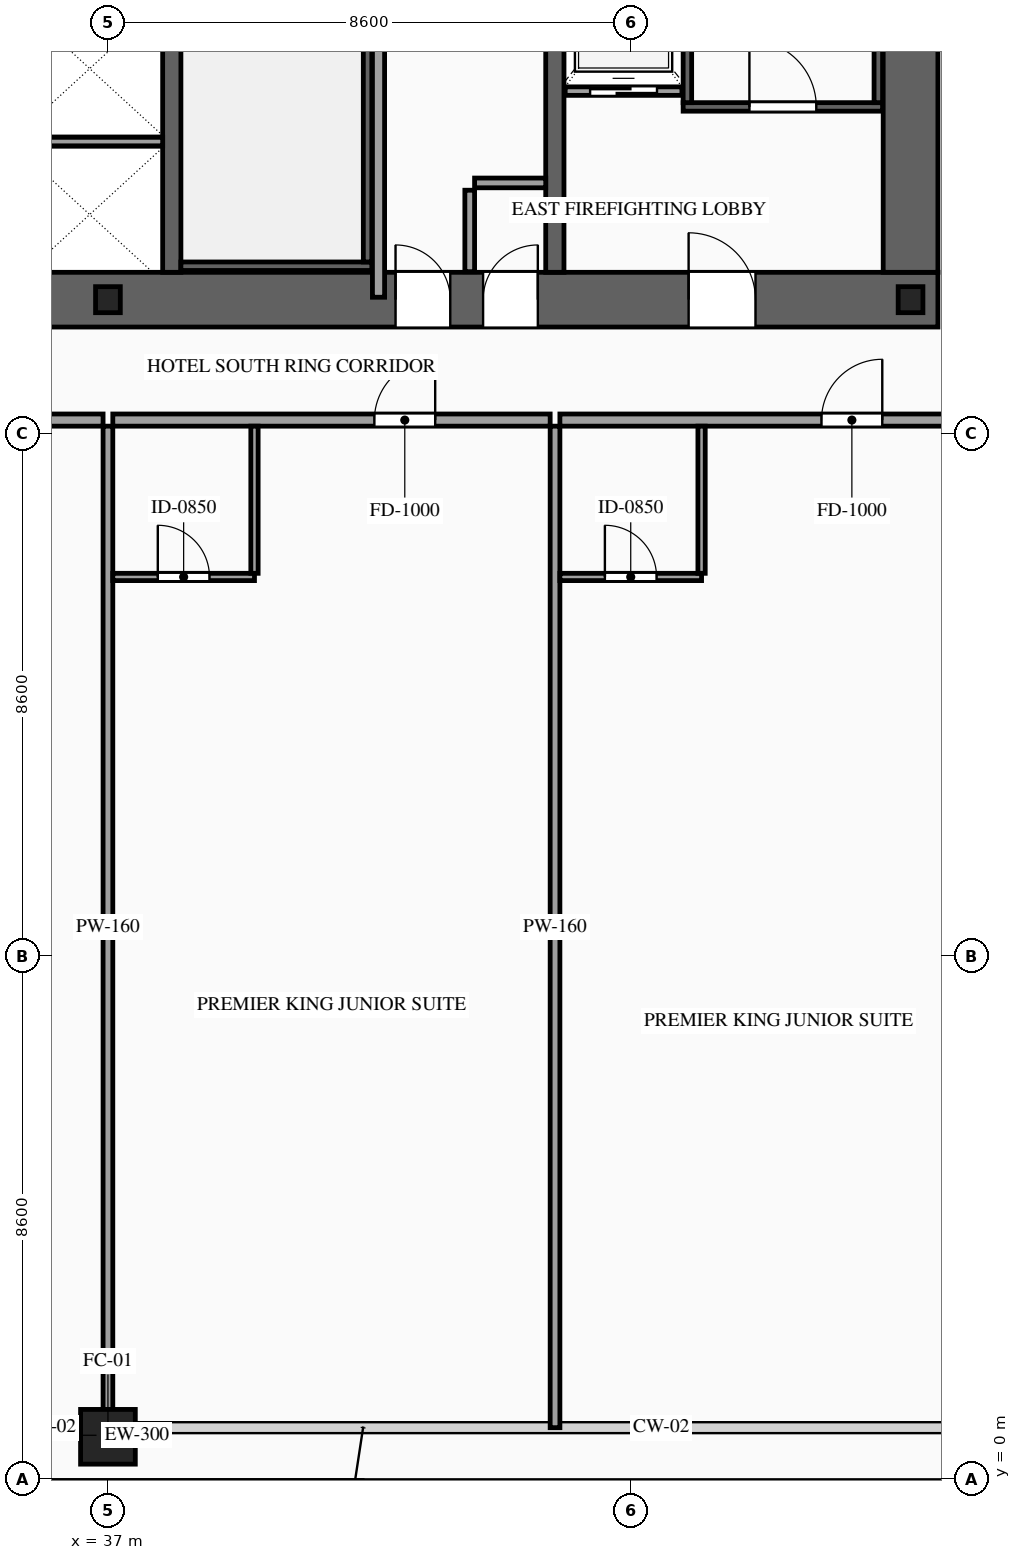
"""IFC4 building model, lengths in metres.
Left out: names, types, materials, properties, quantities, classifications, styles, units other than length and angle.
Written with IfcOpenShell. Run it as: python <this file> out.ifc"""

import sys

from ifc_helpers import new_model, si_unit, direction, frame, frame_2d, origin, origin_2d, place, context, subcontext, project, spatial, rectangle, hollow_rectangle, i_section, extrude, source, transform, mapped, element, fill, save


model = new_model("IFC4")
c1 = context("Model", 3, precision=1e-05, world=origin(), true_north=direction((0.0, 1.0)))
c2 = subcontext(c1, "Body", "Model", "MODEL_VIEW")
j1 = project(units=[si_unit("LENGTHUNIT", "METRE"), si_unit("PLANEANGLEUNIT", "RADIAN")], contexts=[c1])
p1 = place(None, origin())
s1 = spatial("IfcSite", under=j1, at=p1, CompositionType="ELEMENT")
p2 = place(p1, origin())
s2 = spatial("IfcBuilding", under=s1, at=p2, CompositionType="ELEMENT")
p3 = place(p2, frame((0.0, 0.0, 34.2)))
s3 = spatial("IfcBuildingStorey", under=s2, at=p3, CompositionType="ELEMENT", Elevation=34.2)
p4 = place(p3, frame((23.35, 19.4, 0.0), z_axis=(0.0, 0.0, 1.0), x_axis=(1.0, 0.0, 0.0)))
e1 = element("IfcWall", 1, at=p4, inside=s3, PredefinedType="SHEAR", context=c2, shape_type="SweptSolid", body=[
    extrude(rectangle(XDim=27.3, YDim=0.9, at=frame_2d((13.65, 0.0))), origin(), (0.0, 0.0, 1.0), 3.6),
])
p5 = place(p4, frame((2.1, 0.0, 0.0)))
e2 = element("IfcOpeningElement", 2, at=p5, cuts=e1, PredefinedType="OPENING", context=c2, shape_type="SweptSolid", body=[
    extrude(rectangle(XDim=1.1, YDim=2.2, at=frame_2d((0.55, 1.1))), frame((0.0, 0.465, 0.0), z_axis=(0.0, -1.0, 0.0), x_axis=(1.0, 0.0, 0.0)), (0.0, 0.0, 1.0), 0.93),
])
p6 = place(p4, frame((10.0, 0.0, 0.0)))
e3 = element("IfcOpeningElement", 3, at=p6, cuts=e1, PredefinedType="OPENING", context=c2, shape_type="SweptSolid", body=[
    extrude(rectangle(XDim=1.1, YDim=2.2, at=frame_2d((0.55, 1.1))), frame((0.0, 0.465, 0.0), z_axis=(0.0, -1.0, 0.0), x_axis=(1.0, 0.0, 0.0)), (0.0, 0.0, 1.0), 0.93),
])
p7 = place(p4, frame((23.2, 0.0, 0.0)))
e4 = element("IfcOpeningElement", 4, at=p7, cuts=e1, PredefinedType="OPENING", context=c2, shape_type="SweptSolid", body=[
    extrude(rectangle(XDim=1.1, YDim=2.2, at=frame_2d((0.55, 1.1))), frame((0.0, 0.465, 0.0), z_axis=(0.0, -1.0, 0.0), x_axis=(1.0, 0.0, 0.0)), (0.0, 0.0, 1.0), 0.93),
])
p8 = place(p4, frame((19.82, 0.0, 0.0)))
e5 = element("IfcOpeningElement", 5, at=p8, cuts=e1, PredefinedType="OPENING", context=c2, shape_type="SweptSolid", body=[
    extrude(rectangle(XDim=0.9, YDim=2.15, at=frame_2d((0.45, 1.075))), frame((0.0, 0.465, 0.0), z_axis=(0.0, -1.0, 0.0), x_axis=(1.0, 0.0, 0.0)), (0.0, 0.0, 1.0), 0.93),
])
p9 = place(p4, frame((18.38, 0.0, 0.0)))
e6 = element("IfcOpeningElement", 6, at=p9, cuts=e1, PredefinedType="OPENING", context=c2, shape_type="SweptSolid", body=[
    extrude(rectangle(XDim=0.9, YDim=2.15, at=frame_2d((0.45, 1.075))), frame((0.0, 0.465, 0.0), z_axis=(0.0, -1.0, 0.0), x_axis=(1.0, 0.0, 0.0)), (0.0, 0.0, 1.0), 0.93),
])
m1 = source(origin(), c2, "Body", "SweptSolid", [
    extrude(rectangle(XDim=11.9, YDim=0.9, at=frame_2d((5.95, 0.0))), origin(), (0.0, 0.0, 1.0), 3.6),
])
p10 = place(p3, frame((50.2, 19.85, 0.0), z_axis=(0.0, 0.0, 1.0), x_axis=(0.0, 1.0, 0.0)))
e7 = element("IfcWall", 7, at=p10, inside=s3, PredefinedType="SHEAR", context=c2, shape_type="MappedRepresentation", body=[
    mapped(m1, transform((0.0, 0.0, 0.0), scale=1.0)),
])
m2 = source(origin(), c2, "Body", "SweptSolid", [
    extrude(rectangle(XDim=11.9, YDim=0.3, at=frame_2d((5.95, 0.0))), origin(), (0.0, 0.0, 1.0), 3.6),
])
for number, where, z_axis, x_axis in (
    (8, (38.05, 19.85, 0.0), (0.0, 0.0, 1.0), (0.0, 1.0, 0.0)),
    (9, (44.35, 19.85, 0.0), (0.0, 0.0, 1.0), (0.0, 1.0, 0.0)),
):
    element("IfcWall", number, at=place(p3, frame(where, z_axis=z_axis, x_axis=x_axis)), inside=s3, PredefinedType="SOLIDWALL", context=c2, shape_type="MappedRepresentation", body=[
        mapped(m2, transform((0.0, 0.0, 0.0), scale=1.0)),
    ])
m3 = source(origin(), c2, "Body", "SweptSolid", [
    extrude(i_section(OverallWidth=0.407, OverallDepth=0.428, WebThickness=0.02, FlangeThickness=0.035, at=origin_2d()), origin(), (0.0, 0.0, 1.0), 3.6),
])
for number, where, z_axis, x_axis in (
    (10, (37.0, 19.4, 0.0), (0.0, 0.0, 1.0), (1.0, 0.0, 0.0)),
    (11, (50.2, 19.4, 0.0), (0.0, 0.0, 1.0), (1.0, 0.0, 0.0)),
):
    element("IfcColumn", number, at=place(p3, frame(where, z_axis=z_axis, x_axis=x_axis)), inside=s3, PredefinedType="COLUMN", context=c2, shape_type="MappedRepresentation", body=[
        mapped(m3, transform((0.0, 0.0, 0.0), scale=1.0)),
    ])
m4 = source(origin(), c2, "Body", "SweptSolid", [
    extrude(hollow_rectangle(XDim=0.9, YDim=0.9, WallThickness=0.042, at=origin_2d()), origin(), (0.0, 0.0, 1.0), 3.6),
])
p11 = place(p3, frame((37.0, 0.7, 0.0), z_axis=(0.0, 0.0, 1.0), x_axis=(1.0, 0.0, 0.0)))
e12 = element("IfcColumn", 12, at=p11, inside=s3, PredefinedType="COLUMN", context=c2, shape_type="MappedRepresentation", body=[
    mapped(m4, transform((0.0, 0.0, 0.0), scale=1.0)),
])
p12 = place(p3, frame((44.52, 22.83, 0.0), z_axis=(0.0, 0.0, 1.0), x_axis=(1.0, 0.0, 0.0)))
e13 = element("IfcWall", 13, at=p12, inside=s3, PredefinedType="SOLIDWALL", context=c2, shape_type="SweptSolid", body=[
    extrude(rectangle(XDim=1.92, YDim=0.14, at=frame_2d((0.96, 0.0))), origin(), (0.0, 0.0, 1.0), 3.38),
])
p13 = place(p12, frame((0.41, 0.0, 0.0)))
e14 = element("IfcOpeningElement", 14, at=p13, cuts=e13, PredefinedType="OPENING", context=c2, shape_type="SweptSolid", body=[
    extrude(rectangle(XDim=1.1, YDim=2.2, at=frame_2d((0.55, 1.1))), frame((0.0, 0.085, 0.0), z_axis=(0.0, -1.0, 0.0), x_axis=(1.0, 0.0, 0.0)), (0.0, 0.0, 1.0), 0.17),
])
m5 = source(origin(), c2, "Body", "SweptSolid", [
    extrude(rectangle(XDim=2.4, YDim=0.14, at=frame_2d((1.2, 0.0))), origin(), (0.0, 0.0, 1.0), 3.38),
])
p14 = place(p3, frame((35.5, 22.0, 0.0), z_axis=(0.0, 0.0, 1.0), x_axis=(1.0, 0.0, 0.0)))
e15 = element("IfcWall", 15, at=p14, inside=s3, PredefinedType="SOLIDWALL", context=c2, shape_type="MappedRepresentation", body=[
    mapped(m5, transform((0.0, 0.0, 0.0), scale=1.0)),
])
p15 = place(p3, frame((46.46, 22.57, 0.0), z_axis=(0.0, 0.0, 1.0), x_axis=(1.0, 0.0, 0.0)))
e16 = element("IfcWall", 16, at=p15, inside=s3, PredefinedType="SOLIDWALL", context=c2, shape_type="SweptSolid", body=[
    extrude(rectangle(XDim=3.28, YDim=0.14, at=frame_2d((1.64, 0.0))), origin(), (0.0, 0.0, 1.0), 3.38),
])
p16 = place(p15, frame((1.09, 0.0, 0.0)))
e17 = element("IfcOpeningElement", 17, at=p16, cuts=e16, PredefinedType="OPENING", context=c2, shape_type="SweptSolid", body=[
    extrude(rectangle(XDim=1.1, YDim=2.2, at=frame_2d((0.55, 1.1))), frame((0.0, 0.085, 0.0), z_axis=(0.0, -1.0, 0.0), x_axis=(1.0, 0.0, 0.0)), (0.0, 0.0, 1.0), 0.17),
])
m6 = source(origin(), c2, "Body", "SweptSolid", [
    extrude(rectangle(XDim=8.94, YDim=0.14, at=frame_2d((4.47, 0.0))), origin(), (0.0, 0.0, 1.0), 3.38),
])
for number, where, z_axis, x_axis in (
    (18, (46.53, 22.64, 0.0), (0.0, 0.0, 1.0), (0.0, 1.0, 0.0)),
    (19, (49.67, 22.64, 0.0), (0.0, 0.0, 1.0), (0.0, 1.0, 0.0)),
):
    element("IfcWall", number, at=place(p3, frame(where, z_axis=z_axis, x_axis=x_axis)), inside=s3, PredefinedType="SOLIDWALL", context=c2, shape_type="MappedRepresentation", body=[
        mapped(m6, transform((0.0, 0.0, 0.0), scale=1.0)),
    ])
m7 = source(origin(), c2, "Body", "SweptSolid", [
    extrude(rectangle(XDim=3.14, YDim=0.14, at=frame_2d((1.57, 0.0))), origin(), (0.0, 0.0, 1.0), 3.38),
])
p17 = place(p3, frame((38.2, 19.95, 0.0), z_axis=(0.0, 0.0, 1.0), x_axis=(1.0, 0.0, 0.0)))
e20 = element("IfcWall", 20, at=p17, inside=s3, PredefinedType="SOLIDWALL", context=c2, shape_type="MappedRepresentation", body=[
    mapped(m7, transform((0.0, 0.0, 0.0), scale=1.0)),
])
m8 = source(origin(), c2, "Body", "SweptSolid", [
    extrude(rectangle(XDim=8.94, YDim=0.14, at=frame_2d((4.47, 0.0))), origin(), (0.0, 0.0, 1.0), 3.38),
])
p18 = place(p3, frame((41.27, 20.02, 0.0), z_axis=(0.0, 0.0, 1.0), x_axis=(0.0, 1.0, 0.0)))
e21 = element("IfcWall", 21, at=p18, inside=s3, PredefinedType="SOLIDWALL", context=c2, shape_type="MappedRepresentation", body=[
    mapped(m8, transform((0.0, 0.0, 0.0), scale=1.0)),
])
m9 = source(origin(), c2, "Body", "SweptSolid", [
    extrude(rectangle(XDim=1.34, YDim=0.16, at=frame_2d((0.67, 0.0))), origin(), (0.0, 0.0, 1.0), 3.38),
])
p19 = place(p3, frame((42.95, 19.86, 0.0), z_axis=(0.0, 0.0, 1.0), x_axis=(0.0, 1.0, 0.0)))
e22 = element("IfcWall", 22, at=p19, inside=s3, PredefinedType="PARTITIONING", context=c2, shape_type="MappedRepresentation", body=[
    mapped(m9, transform((0.0, 0.0, 0.0), scale=1.0)),
])
m10 = source(origin(), c2, "Body", "SweptSolid", [
    extrude(rectangle(XDim=1.17, YDim=0.16, at=frame_2d((0.585, 0.0))), origin(), (0.0, 0.0, 1.0), 3.38),
])
p20 = place(p3, frame((43.03, 21.32, 0.0), z_axis=(0.0, 0.0, 1.0), x_axis=(1.0, 0.0, 0.0)))
e23 = element("IfcWall", 23, at=p20, inside=s3, PredefinedType="PARTITIONING", context=c2, shape_type="MappedRepresentation", body=[
    mapped(m10, transform((0.0, 0.0, 0.0), scale=1.0)),
])
m11 = source(origin(), c2, "Body", "SweptSolid", [
    extrude(rectangle(XDim=12.72, YDim=0.2, at=frame_2d((6.36, 0.0))), origin(), (0.0, 0.0, 1.0), 3.38),
])
p21 = place(p3, frame((41.45, 19.44, 0.0), z_axis=(0.0, 0.0, 1.0), x_axis=(0.0, 1.0, 0.0)))
e24 = element("IfcWall", 24, at=p21, inside=s3, PredefinedType="PARTITIONING", context=c2, shape_type="MappedRepresentation", body=[
    mapped(m11, transform((0.0, 0.0, 0.0), scale=1.0)),
])
p22 = place(p3, frame((29.727, 17.42, 0.0), z_axis=(0.0, 0.0, 1.0), x_axis=(1.0, 0.0, 0.0)))
e25 = element("IfcWall", 25, at=p22, inside=s3, PredefinedType="PARTITIONING", context=c2, shape_type="SweptSolid", body=[
    extrude(rectangle(XDim=7.193, YDim=0.2, at=frame_2d((3.596, 0.0))), origin(), (0.0, 0.0, 1.0), 3.38),
])
p23 = place(p22, frame((4.302, 0.0, 0.0)))
e26 = element("IfcOpeningElement", 26, at=p23, cuts=e25, PredefinedType="OPENING", context=c2, shape_type="SweptSolid", body=[
    extrude(rectangle(XDim=1.0, YDim=2.2, at=frame_2d((0.5, 1.1))), frame((0.0, 0.115, 0.0), z_axis=(0.0, -1.0, 0.0), x_axis=(1.0, 0.0, 0.0)), (0.0, 0.0, 1.0), 0.23),
])
m12 = source(origin(), c2, "Body", "SweptSolid", [
    extrude(rectangle(XDim=16.47, YDim=0.16, at=frame_2d((8.235, 0.0))), origin(), (0.0, 0.0, 1.0), 2.575),
])
p24 = place(p3, frame((37.0, 0.85, 0.0), z_axis=(0.0, 0.0, 1.0), x_axis=(0.0, 1.0, 0.0)))
e27 = element("IfcWall", 27, at=p24, inside=s3, PredefinedType="PARTITIONING", context=c2, shape_type="MappedRepresentation", body=[
    mapped(m12, transform((0.0, 0.0, 0.0), scale=1.0)),
])
p25 = place(p3, frame((37.08, 17.42, 0.0), z_axis=(0.0, 0.0, 1.0), x_axis=(1.0, 0.0, 0.0)))
e28 = element("IfcWall", 28, at=p25, inside=s3, PredefinedType="PARTITIONING", context=c2, shape_type="SweptSolid", body=[
    extrude(rectangle(XDim=7.193, YDim=0.2, at=frame_2d((3.596, 0.0))), origin(), (0.0, 0.0, 1.0), 3.38),
])
p26 = place(p25, frame((4.302, 0.0, 0.0)))
e29 = element("IfcOpeningElement", 29, at=p26, cuts=e28, PredefinedType="OPENING", context=c2, shape_type="SweptSolid", body=[
    extrude(rectangle(XDim=1.0, YDim=2.2, at=frame_2d((0.5, 1.1))), frame((0.0, 0.115, 0.0), z_axis=(0.0, -1.0, 0.0), x_axis=(1.0, 0.0, 0.0)), (0.0, 0.0, 1.0), 0.23),
])
m13 = source(origin(), c2, "Body", "SweptSolid", [
    extrude(rectangle(XDim=16.47, YDim=0.16, at=frame_2d((8.235, 0.0))), origin(), (0.0, 0.0, 1.0), 3.38),
])
p27 = place(p3, frame((44.353, 0.85, 0.0), z_axis=(0.0, 0.0, 1.0), x_axis=(0.0, 1.0, 0.0)))
e30 = element("IfcWall", 30, at=p27, inside=s3, PredefinedType="PARTITIONING", context=c2, shape_type="MappedRepresentation", body=[
    mapped(m13, transform((0.0, 0.0, 0.0), scale=1.0)),
])
p28 = place(p3, frame((37.08, 14.84, 0.0), z_axis=(0.0, 0.0, 1.0), x_axis=(1.0, 0.0, 0.0)))
e31 = element("IfcWall", 31, at=p28, inside=s3, PredefinedType="PARTITIONING", context=c2, shape_type="SweptSolid", body=[
    extrude(rectangle(XDim=2.33, YDim=0.12, at=frame_2d((1.165, 0.0))), origin(), (0.0, 0.0, 1.0), 3.38),
])
p29 = place(p28, frame((0.74, 0.0, 0.0)))
e32 = element("IfcOpeningElement", 32, at=p29, cuts=e31, PredefinedType="OPENING", context=c2, shape_type="SweptSolid", body=[
    extrude(rectangle(XDim=0.85, YDim=2.1, at=frame_2d((0.425, 1.05))), frame((0.0, 0.075, 0.0), z_axis=(0.0, -1.0, 0.0), x_axis=(1.0, 0.0, 0.0)), (0.0, 0.0, 1.0), 0.15),
])
m14 = source(origin(), c2, "Body", "SweptSolid", [
    extrude(rectangle(XDim=2.42, YDim=0.12, at=frame_2d((1.21, 0.0))), origin(), (0.0, 0.0, 1.0), 3.38),
])
p30 = place(p3, frame((39.41, 14.9, 0.0), z_axis=(0.0, 0.0, 1.0), x_axis=(0.0, 1.0, 0.0)))
e33 = element("IfcWall", 33, at=p30, inside=s3, PredefinedType="PARTITIONING", context=c2, shape_type="MappedRepresentation", body=[
    mapped(m14, transform((0.0, 0.0, 0.0), scale=1.0)),
])
p31 = place(p3, frame((44.433, 17.42, 0.0), z_axis=(0.0, 0.0, 1.0), x_axis=(1.0, 0.0, 0.0)))
e34 = element("IfcWall", 34, at=p31, inside=s3, PredefinedType="PARTITIONING", context=c2, shape_type="SweptSolid", body=[
    extrude(rectangle(XDim=7.194, YDim=0.2, at=frame_2d((3.597, 0.0))), origin(), (0.0, 0.0, 1.0), 3.38),
])
p32 = place(p31, frame((4.302, 0.0, 0.0)))
e35 = element("IfcOpeningElement", 35, at=p32, cuts=e34, PredefinedType="OPENING", context=c2, shape_type="SweptSolid", body=[
    extrude(rectangle(XDim=1.0, YDim=2.2, at=frame_2d((0.5, 1.1))), frame((0.0, 0.115, 0.0), z_axis=(0.0, -1.0, 0.0), x_axis=(1.0, 0.0, 0.0)), (0.0, 0.0, 1.0), 0.23),
])
p33 = place(p3, frame((44.433, 14.84, 0.0), z_axis=(0.0, 0.0, 1.0), x_axis=(1.0, 0.0, 0.0)))
e36 = element("IfcWall", 36, at=p33, inside=s3, PredefinedType="PARTITIONING", context=c2, shape_type="SweptSolid", body=[
    extrude(rectangle(XDim=2.33, YDim=0.12, at=frame_2d((1.165, 0.0))), origin(), (0.0, 0.0, 1.0), 3.38),
])
p34 = place(p33, frame((0.74, 0.0, 0.0)))
e37 = element("IfcOpeningElement", 37, at=p34, cuts=e36, PredefinedType="OPENING", context=c2, shape_type="SweptSolid", body=[
    extrude(rectangle(XDim=0.85, YDim=2.1, at=frame_2d((0.425, 1.05))), frame((0.0, 0.075, 0.0), z_axis=(0.0, -1.0, 0.0), x_axis=(1.0, 0.0, 0.0)), (0.0, 0.0, 1.0), 0.15),
])
p35 = place(p3, frame((46.763, 14.9, 0.0), z_axis=(0.0, 0.0, 1.0), x_axis=(0.0, 1.0, 0.0)))
e38 = element("IfcWall", 38, at=p35, inside=s3, PredefinedType="PARTITIONING", context=c2, shape_type="MappedRepresentation", body=[
    mapped(m14, transform((0.0, 0.0, 0.0), scale=1.0)),
])
m15 = source(origin(), c2, "Body", "SweptSolid", [
    extrude(rectangle(XDim=1.1, YDim=2.2, at=frame_2d((0.55, 1.1))), frame((0.0, 0.025, 0.0), z_axis=(0.0, -1.0, 0.0), x_axis=(1.0, 0.0, 0.0)), (0.0, 0.0, 1.0), 0.05),
])
p36 = place(p13, origin())
e39 = element("IfcDoor", 39, at=p36, inside=s3, OperationType="SLIDING_TO_RIGHT", PredefinedType="DOOR", context=c2, shape_type="MappedRepresentation", body=[
    mapped(m15, transform((0.0, 0.0, 0.0), scale=1.0)),
])
fill(e14, e39)
m16 = source(origin(), c2, "Body", "SweptSolid", [
    extrude(rectangle(XDim=1.1, YDim=2.2, at=frame_2d((0.55, 1.1))), frame((0.0, 0.025, 0.0), z_axis=(0.0, -1.0, 0.0), x_axis=(1.0, 0.0, 0.0)), (0.0, 0.0, 1.0), 0.05),
])
p37 = place(p16, origin())
e40 = element("IfcDoor", 40, at=p37, inside=s3, OperationType="SINGLE_SWING_LEFT", PredefinedType="DOOR", context=c2, shape_type="MappedRepresentation", body=[
    mapped(m16, transform((0.0, 0.0, 0.0), scale=1.0)),
])
fill(e17, e40)
p38 = place(p7, origin())
e41 = element("IfcDoor", 41, at=p38, inside=s3, OperationType="SINGLE_SWING_LEFT", PredefinedType="DOOR", context=c2, shape_type="MappedRepresentation", body=[
    mapped(m16, transform((0.0, 0.0, 0.0), scale=1.0)),
])
fill(e4, e41)
m17 = source(origin(), c2, "Body", "SweptSolid", [
    extrude(rectangle(XDim=0.9, YDim=2.15, at=frame_2d((0.45, 1.075))), frame((0.0, 0.025, 0.0), z_axis=(0.0, -1.0, 0.0), x_axis=(1.0, 0.0, 0.0)), (0.0, 0.0, 1.0), 0.05),
])
p39 = place(p8, origin())
e42 = element("IfcDoor", 42, at=p39, inside=s3, OperationType="SINGLE_SWING_RIGHT", PredefinedType="DOOR", context=c2, shape_type="MappedRepresentation", body=[
    mapped(m17, transform((0.0, 0.0, 0.0), scale=1.0)),
])
fill(e5, e42)
p40 = place(p9, origin())
e43 = element("IfcDoor", 43, at=p40, inside=s3, OperationType="SINGLE_SWING_LEFT", PredefinedType="DOOR", context=c2, shape_type="MappedRepresentation", body=[
    mapped(m17, transform((0.0, 0.0, 0.0), scale=1.0)),
])
fill(e6, e43)
m18 = source(origin(), c2, "Body", "SweptSolid", [
    extrude(rectangle(XDim=1.0, YDim=2.2, at=frame_2d((0.5, 1.1))), frame((0.0, 0.025, 0.0), z_axis=(0.0, -1.0, 0.0), x_axis=(1.0, 0.0, 0.0)), (0.0, 0.0, 1.0), 0.05),
])
p41 = place(p26, origin())
e44 = element("IfcDoor", 44, at=p41, inside=s3, OperationType="SINGLE_SWING_RIGHT", PredefinedType="DOOR", context=c2, shape_type="MappedRepresentation", body=[
    mapped(m18, transform((0.0, 0.0, 0.0), scale=1.0)),
])
fill(e29, e44)
m19 = source(origin(), c2, "Body", "SweptSolid", [
    extrude(rectangle(XDim=0.85, YDim=2.1, at=frame_2d((0.425, 1.05))), frame((0.0, 0.025, 0.0), z_axis=(0.0, -1.0, 0.0), x_axis=(1.0, 0.0, 0.0)), (0.0, 0.0, 1.0), 0.05),
])
p42 = place(p29, origin())
e45 = element("IfcDoor", 45, at=p42, inside=s3, OperationType="SINGLE_SWING_LEFT", PredefinedType="DOOR", context=c2, shape_type="MappedRepresentation", body=[
    mapped(m19, transform((0.0, 0.0, 0.0), scale=1.0)),
])
fill(e32, e45)
p43 = place(p32, origin())
e46 = element("IfcDoor", 46, at=p43, inside=s3, OperationType="SINGLE_SWING_RIGHT", PredefinedType="DOOR", context=c2, shape_type="MappedRepresentation", body=[
    mapped(m18, transform((0.0, 0.0, 0.0), scale=1.0)),
])
fill(e35, e46)
p44 = place(p34, origin())
e47 = element("IfcDoor", 47, at=p44, inside=s3, OperationType="SINGLE_SWING_LEFT", PredefinedType="DOOR", context=c2, shape_type="MappedRepresentation", body=[
    mapped(m19, transform((0.0, 0.0, 0.0), scale=1.0)),
])
fill(e37, e47)
save(model, sys.argv[1])
